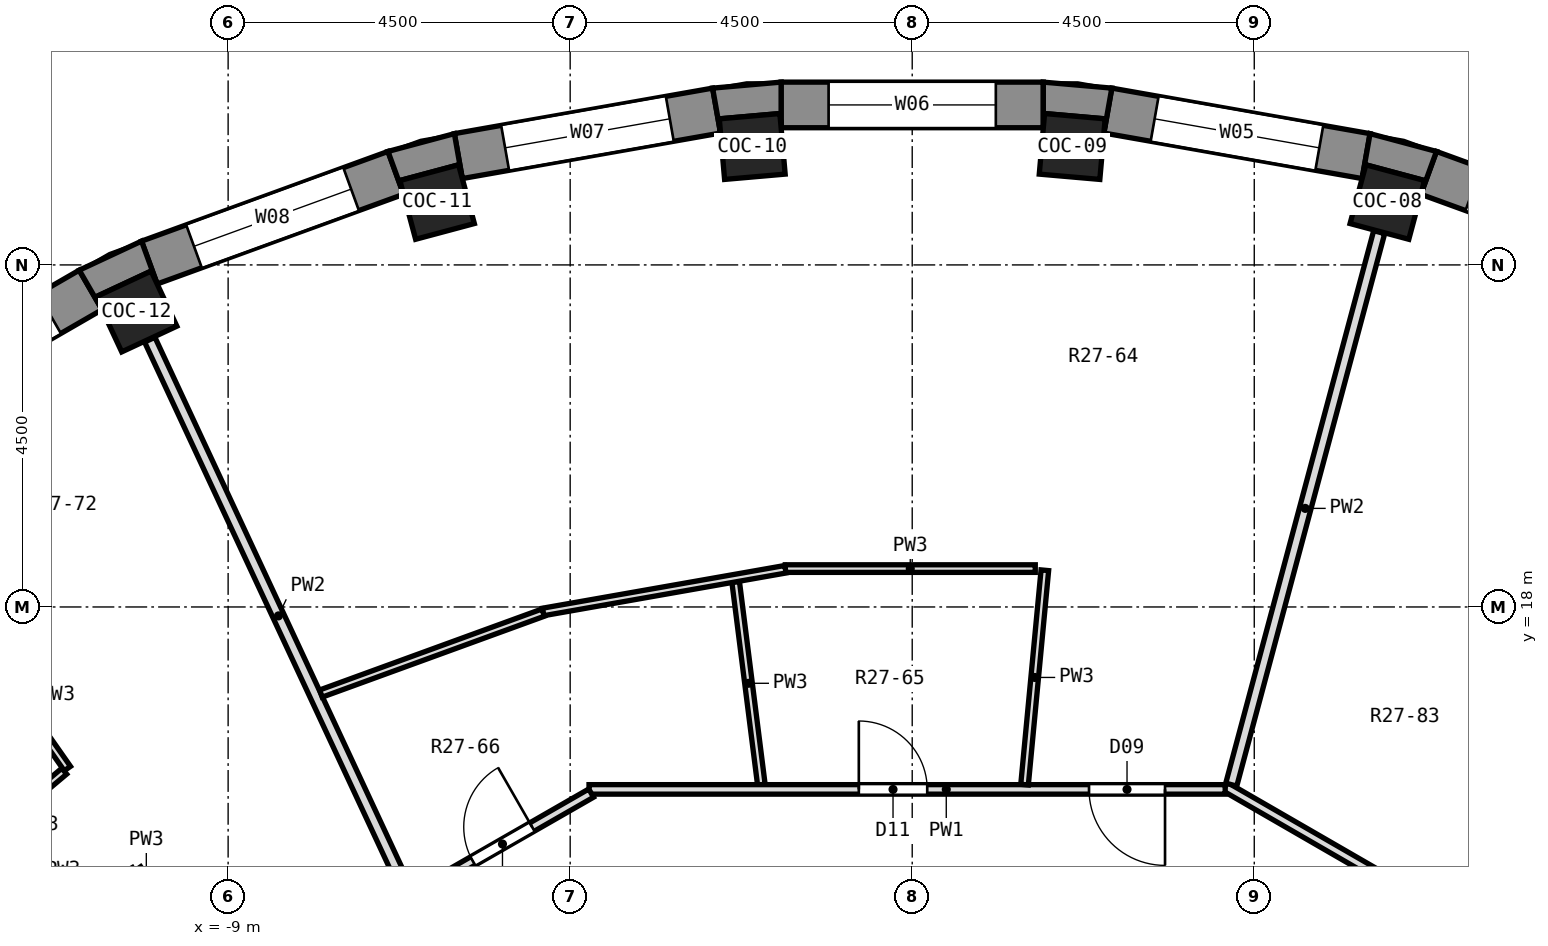
"""IFC4 building model, lengths in metres.
Left out: names, types, materials, properties, quantities, classifications, styles, units other than length and angle.
Written with IfcOpenShell. Run it as: python <this file> out.ifc"""

import sys

from ifc_helpers import new_model, si_unit, direction, frame, frame_2d, origin, origin_2d, place, context, subcontext, project, spatial, polyline, rectangle, outline, extrude, element, fill, save


model = new_model("IFC4")
c1 = context("Model", 3, precision=1e-05, world=origin(), true_north=direction((0.0, 1.0)))
c2 = subcontext(c1, "Body", "Model", "MODEL_VIEW")
j1 = project(units=[si_unit("LENGTHUNIT", "METRE"), si_unit("PLANEANGLEUNIT", "RADIAN")], contexts=[c1])
p1 = place(None, origin())
s1 = spatial("IfcSite", under=j1, at=p1, CompositionType="ELEMENT")
p2 = place(p1, origin())
s2 = spatial("IfcBuilding", under=s1, at=p2, CompositionType="ELEMENT")
p3 = place(p2, frame((0.0, 0.0, 180.6)))
s3 = spatial("IfcBuildingStorey", under=s2, at=p3, CompositionType="ELEMENT", Elevation=180.6)
for number, where, z_axis, x_axis in (
    (1, (6.25, 23.327, 0.0), (0.0, 0.0, 1.0), (0.259, 0.966, 0.0)),
    (2, (2.105, 24.058, 0.0), (0.0, 0.0, 1.0), (0.087, 0.996, 0.0)),
    (3, (-2.105, 24.058, 0.0), (0.0, 0.0, 1.0), (-0.087, 0.996, 0.0)),
    (4, (-6.25, 23.327, 0.0), (0.0, 0.0, 1.0), (-0.259, 0.966, 0.0)),
    (5, (-10.206, 21.887, 0.0), (0.0, 0.0, 1.0), (-0.423, 0.906, 0.0)),
):
    element("IfcColumn", number, at=place(p3, frame(where, z_axis=z_axis, x_axis=x_axis)), inside=s3, PredefinedType="COLUMN", context=c2, shape_type="SweptSolid", body=[
        extrude(rectangle(XDim=0.8, YDim=0.8, at=origin_2d()), origin(), (0.0, 0.0, 1.0), 3.3),
    ])
p4 = place(p3, frame((10.036, 22.531, 0.0), z_axis=(0.0, 0.0, 1.0), x_axis=(-0.93968799822, 0.342032843455, 0.0)))
e6 = element("IfcWall", 6, at=p4, inside=s3, PredefinedType="SOLIDWALL", context=c2, shape_type="SweptSolid", body=[
    extrude(rectangle(XDim=3.45, YDim=0.6, at=frame_2d((1.725, 0.0))), origin(), (0.0, 0.0, 1.0), 2.85),
])
p5 = place(p4, frame((0.625, 0.0, 0.9)))
e7 = element("IfcOpeningElement", 7, at=p5, cuts=e6, PredefinedType="OPENING", context=c2, shape_type="SweptSolid", body=[
    extrude(rectangle(XDim=2.2, YDim=1.8, at=frame_2d((1.1, 0.9))), frame((0.0, 0.312, 0.0), z_axis=(0.0, -1.0, 0.0), x_axis=(1.0, 0.0, 0.0)), (0.0, 0.0, 1.0), 0.624),
])
p6 = place(p3, frame((5.971, 23.932, 0.0), z_axis=(0.0, 0.0, 1.0), x_axis=(-0.984814892183, 0.173607684551, 0.0)))
e8 = element("IfcWall", 8, at=p6, inside=s3, PredefinedType="SOLIDWALL", context=c2, shape_type="SweptSolid", body=[
    extrude(rectangle(XDim=3.45, YDim=0.6, at=frame_2d((1.725, 0.0))), origin(), (0.0, 0.0, 1.0), 2.85),
])
p7 = place(p6, frame((0.625, 0.0, 0.9)))
e9 = element("IfcOpeningElement", 9, at=p7, cuts=e8, PredefinedType="OPENING", context=c2, shape_type="SweptSolid", body=[
    extrude(rectangle(XDim=2.2, YDim=1.8, at=frame_2d((1.1, 0.9))), frame((0.0, 0.312, 0.0), z_axis=(0.0, -1.0, 0.0), x_axis=(1.0, 0.0, 0.0)), (0.0, 0.0, 1.0), 0.624),
])
p8 = place(p3, frame((1.725, 24.605, 0.0), z_axis=(0.0, 0.0, 1.0), x_axis=(-1.0, 0.0, 0.0)))
e10 = element("IfcWall", 10, at=p8, inside=s3, PredefinedType="SOLIDWALL", context=c2, shape_type="SweptSolid", body=[
    extrude(rectangle(XDim=3.45, YDim=0.6, at=frame_2d((1.725, 0.0))), origin(), (0.0, 0.0, 1.0), 2.85),
])
p9 = place(p8, frame((0.625, 0.0, 0.9)))
e11 = element("IfcOpeningElement", 11, at=p9, cuts=e10, PredefinedType="OPENING", context=c2, shape_type="SweptSolid", body=[
    extrude(rectangle(XDim=2.2, YDim=1.8, at=frame_2d((1.1, 0.9))), frame((0.0, 0.312, 0.0), z_axis=(0.0, -1.0, 0.0), x_axis=(1.0, 0.0, 0.0)), (0.0, 0.0, 1.0), 0.624),
])
p10 = place(p3, frame((-2.574, 24.531, 0.0), z_axis=(0.0, 0.0, 1.0), x_axis=(-0.984814892183, -0.173607684551, 0.0)))
e12 = element("IfcWall", 12, at=p10, inside=s3, PredefinedType="SOLIDWALL", context=c2, shape_type="SweptSolid", body=[
    extrude(rectangle(XDim=3.45, YDim=0.6, at=frame_2d((1.725, 0.0))), origin(), (0.0, 0.0, 1.0), 2.85),
])
p11 = place(p10, frame((0.625, 0.0, 0.9)))
e13 = element("IfcOpeningElement", 13, at=p11, cuts=e12, PredefinedType="OPENING", context=c2, shape_type="SweptSolid", body=[
    extrude(rectangle(XDim=2.2, YDim=1.8, at=frame_2d((1.1, 0.9))), frame((0.0, 0.312, 0.0), z_axis=(0.0, -1.0, 0.0), x_axis=(1.0, 0.0, 0.0)), (0.0, 0.0, 1.0), 0.624),
])
p12 = place(p3, frame((-6.794, 23.711, 0.0), z_axis=(0.0, 0.0, 1.0), x_axis=(-0.93968799822, -0.342032843455, 0.0)))
e14 = element("IfcWall", 14, at=p12, inside=s3, PredefinedType="SOLIDWALL", context=c2, shape_type="SweptSolid", body=[
    extrude(rectangle(XDim=3.45, YDim=0.6, at=frame_2d((1.725, 0.0))), origin(), (0.0, 0.0, 1.0), 2.85),
])
p13 = place(p12, frame((0.625, 0.0, 0.9)))
e15 = element("IfcOpeningElement", 15, at=p13, cuts=e14, PredefinedType="OPENING", context=c2, shape_type="SweptSolid", body=[
    extrude(rectangle(XDim=2.2, YDim=1.8, at=frame_2d((1.1, 0.9))), frame((0.0, 0.312, 0.0), z_axis=(0.0, -1.0, 0.0), x_axis=(1.0, 0.0, 0.0)), (0.0, 0.0, 1.0), 0.624),
])
p14 = place(p3, frame((-10.809, 22.171, 0.0), z_axis=(0.0, 0.0, 1.0), x_axis=(-0.86602648383, -0.499998129301, 0.0)))
e16 = element("IfcWall", 16, at=p14, inside=s3, PredefinedType="SOLIDWALL", context=c2, shape_type="SweptSolid", body=[
    extrude(rectangle(XDim=3.45, YDim=0.6, at=frame_2d((1.725, 0.0))), origin(), (0.0, 0.0, 1.0), 2.85),
])
p15 = place(p14, frame((0.625, 0.0, 0.9)))
e17 = element("IfcOpeningElement", 17, at=p15, cuts=e16, PredefinedType="OPENING", context=c2, shape_type="SweptSolid", body=[
    extrude(rectangle(XDim=2.2, YDim=1.8, at=frame_2d((1.1, 0.9))), frame((0.0, 0.312, 0.0), z_axis=(0.0, -1.0, 0.0), x_axis=(1.0, 0.0, 0.0)), (0.0, 0.0, 1.0), 0.624),
])
p16 = place(p3, origin())
e18 = element("IfcWall", 18, at=p16, inside=s3, PredefinedType="SOLIDWALL", context=c2, shape_type="SweptSolid", body=[
    extrude(outline(polyline([(6.023, 24.227), (5.919, 23.636), (5.968, 23.817), (6.74, 23.61), (6.692, 23.429), (6.897, 23.993), (6.023, 24.227)])), origin(), (0.0, 0.0, 1.0), 2.85),
])
p17 = place(p3, origin())
e19 = element("IfcWall", 19, at=p17, inside=s3, PredefinedType="SOLIDWALL", context=c2, shape_type="SweptSolid", body=[
    extrude(outline(polyline([(2.626, 24.826), (1.725, 24.905), (1.725, 24.305), (1.741, 24.491), (2.538, 24.422), (2.522, 24.235), (2.626, 24.826)])), origin(), (0.0, 0.0, 1.0), 2.85),
])
p18 = place(p3, origin())
e20 = element("IfcWall", 20, at=p18, inside=s3, PredefinedType="SOLIDWALL", context=c2, shape_type="SweptSolid", body=[
    extrude(outline(polyline([(-1.725, 24.905), (-2.626, 24.826), (-2.522, 24.235), (-2.538, 24.422), (-1.741, 24.491), (-1.725, 24.305), (-1.725, 24.905)])), origin(), (0.0, 0.0, 1.0), 2.85),
])
p19 = place(p3, origin())
e21 = element("IfcWall", 21, at=p19, inside=s3, PredefinedType="SOLIDWALL", context=c2, shape_type="SweptSolid", body=[
    extrude(outline(polyline([(-6.023, 24.227), (-6.897, 23.993), (-6.692, 23.429), (-6.74, 23.61), (-5.968, 23.817), (-5.919, 23.636), (-6.023, 24.227)])), origin(), (0.0, 0.0, 1.0), 2.85),
])
p20 = place(p3, origin())
e22 = element("IfcWall", 22, at=p20, inside=s3, PredefinedType="SOLIDWALL", context=c2, shape_type="SweptSolid", body=[
    extrude(outline(polyline([(-10.959, 22.431), (-10.659, 21.911), (-10.738, 22.081), (-10.013, 22.419), (-9.934, 22.249), (-10.139, 22.813), (-10.959, 22.431)])), origin(), (0.0, 0.0, 1.0), 2.85),
])
p21 = place(p3, frame((-2.323, 18.33, 0.0), z_axis=(0.0, 0.0, 1.0), x_axis=(0.125632208846, -0.992076886184, 0.0)))
e23 = element("IfcWall", 23, at=p21, inside=s3, PredefinedType="PARTITIONING", context=c2, shape_type="SweptSolid", body=[
    extrude(rectangle(XDim=2.689, YDim=0.1, at=frame_2d((1.345, 0.0))), origin(), (0.0, 0.0, 1.0), 2.85),
])
p22 = place(p3, frame((-10.031, 21.517, 0.0), z_axis=(0.0, 0.0, 1.0), x_axis=(0.422305280768, -0.906453666679, 0.0)))
e24 = element("IfcWall", 24, at=p22, inside=s3, PredefinedType="PARTITIONING", context=c2, shape_type="SweptSolid", body=[
    extrude(rectangle(XDim=8.018, YDim=0.15, at=frame_2d((4.009, 0.0))), origin(), (0.0, 0.0, 1.0), 2.85),
])
p23 = place(p3, frame((-12.468, 17.806, 0.0), z_axis=(0.0, 0.0, 1.0), x_axis=(0.573594339991, -0.819139507734, 0.0)))
e25 = element("IfcWall", 25, at=p23, inside=s3, PredefinedType="PARTITIONING", context=c2, shape_type="SweptSolid", body=[
    extrude(rectangle(XDim=2.358, YDim=0.1, at=frame_2d((1.179, 0.0))), origin(), (0.0, 0.0, 1.0), 2.85),
])
p24 = place(p3, frame((4.117, 15.636, 0.0), z_axis=(0.0, 0.0, 1.0), x_axis=(0.866036031404, -0.49998159197, 0.0)))
e26 = element("IfcWall", 26, at=p24, inside=s3, PredefinedType="PARTITIONING", context=c2, shape_type="SweptSolid", body=[
    extrude(rectangle(XDim=3.724, YDim=0.125, at=frame_2d((1.862, 0.0))), origin(), (0.0, 0.0, 1.0), 2.85),
])
p25 = place(p3, frame((-4.252, 15.6, 0.0), z_axis=(0.0, 0.0, 1.0), x_axis=(1.0, 0.0, 0.0)))
e27 = element("IfcWall", 27, at=p25, inside=s3, PredefinedType="PARTITIONING", context=c2, shape_type="SweptSolid", body=[
    extrude(rectangle(XDim=8.369, YDim=0.125, at=frame_2d((4.185, 0.0))), origin(), (0.0, 0.0, 1.0), 2.85),
])
p26 = place(p25, frame((6.578, 0.0, 0.0)))
e28 = element("IfcOpeningElement", 28, at=p26, cuts=e27, PredefinedType="OPENING", context=c2, shape_type="SweptSolid", body=[
    extrude(rectangle(XDim=1.0, YDim=2.1, at=frame_2d((0.5, 1.05))), frame((0.0, 0.074, 0.0), z_axis=(0.0, -1.0, 0.0), x_axis=(1.0, 0.0, 0.0)), (0.0, 0.0, 1.0), 0.149),
])
p27 = place(p25, frame((3.55, 0.0, 0.0)))
e29 = element("IfcOpeningElement", 29, at=p27, cuts=e27, PredefinedType="OPENING", context=c2, shape_type="SweptSolid", body=[
    extrude(rectangle(XDim=0.9, YDim=2.1, at=frame_2d((0.45, 1.05))), frame((0.0, 0.074, 0.0), z_axis=(0.0, -1.0, 0.0), x_axis=(1.0, 0.0, 0.0)), (0.0, 0.0, 1.0), 0.149),
])
p28 = place(p3, frame((-1.67, 18.505, 0.0), z_axis=(0.0, 0.0, 1.0), x_axis=(1.0, 0.0, 0.0)))
e30 = element("IfcWall", 30, at=p28, inside=s3, PredefinedType="PARTITIONING", context=c2, shape_type="SweptSolid", body=[
    extrude(rectangle(XDim=3.289, YDim=0.1, at=frame_2d((1.644, 0.0))), origin(), (0.0, 0.0, 1.0), 2.85),
])
p29 = place(p3, frame((-4.858, 17.934, 0.0), z_axis=(0.0, 0.0, 1.0), x_axis=(0.984816929669, 0.173596126217, 0.0)))
e31 = element("IfcWall", 31, at=p29, inside=s3, PredefinedType="PARTITIONING", context=c2, shape_type="SweptSolid", body=[
    extrude(rectangle(XDim=3.239, YDim=0.1, at=frame_2d((1.619, 0.0))), origin(), (0.0, 0.0, 1.0), 2.85),
])
p30 = place(p3, frame((-7.78, 16.861, 0.0), z_axis=(0.0, 0.0, 1.0), x_axis=(0.939616954474, 0.3422279633, 0.0)))
e32 = element("IfcWall", 32, at=p30, inside=s3, PredefinedType="PARTITIONING", context=c2, shape_type="SweptSolid", body=[
    extrude(rectangle(XDim=3.113, YDim=0.1, at=frame_2d((1.556, 0.0))), origin(), (0.0, 0.0, 1.0), 2.85),
])
p31 = place(p3, frame((-11.484, 11.385, 0.0), z_axis=(0.0, 0.0, 1.0), x_axis=(0.867331679026, 0.49773060842, 0.0)))
e33 = element("IfcWall", 33, at=p31, inside=s3, PredefinedType="PARTITIONING", context=c2, shape_type="SweptSolid", body=[
    extrude(rectangle(XDim=8.371, YDim=0.125, at=frame_2d((4.185, 0.0))), origin(), (0.0, 0.0, 1.0), 2.85),
])
p32 = place(p31, frame((6.575, 0.0, 0.0)))
e34 = element("IfcOpeningElement", 34, at=p32, cuts=e33, PredefinedType="OPENING", context=c2, shape_type="SweptSolid", body=[
    extrude(rectangle(XDim=0.9, YDim=2.1, at=frame_2d((0.45, 1.05))), frame((0.0, 0.074, 0.0), z_axis=(0.0, -1.0, 0.0), x_axis=(1.0, 0.0, 0.0)), (0.0, 0.0, 1.0), 0.149),
])
p33 = place(p3, frame((-12.842, 14.425, 0.0), z_axis=(0.0, 0.0, 1.0), x_axis=(0.766089344118, 0.642734094964, 0.0)))
e35 = element("IfcWall", 35, at=p33, inside=s3, PredefinedType="PARTITIONING", context=c2, shape_type="SweptSolid", body=[
    extrude(rectangle(XDim=2.201, YDim=0.1, at=frame_2d((1.101, 0.0))), origin(), (0.0, 0.0, 1.0), 2.85),
])
p34 = place(p3, frame((4.198, 15.663, 0.0), z_axis=(0.0, 0.0, 1.0), x_axis=(0.258633906583, 0.96597541499, 0.0)))
e36 = element("IfcWall", 36, at=p34, inside=s3, PredefinedType="PARTITIONING", context=c2, shape_type="SweptSolid", body=[
    extrude(rectangle(XDim=7.524, YDim=0.15, at=frame_2d((3.762, 0.0))), origin(), (0.0, 0.0, 1.0), 2.85),
])
p35 = place(p3, frame((1.478, 15.662, 0.0), z_axis=(0.0, 0.0, 1.0), x_axis=(0.094349605613, 0.995539126263, 0.0)))
e37 = element("IfcWall", 37, at=p35, inside=s3, PredefinedType="PARTITIONING", context=c2, shape_type="SweptSolid", body=[
    extrude(rectangle(XDim=2.833, YDim=0.1, at=frame_2d((1.417, 0.0))), origin(), (0.0, 0.0, 1.0), 2.85),
])
p36 = place(p7, origin())
e38 = element("IfcWindow", 38, at=p36, inside=s3, PartitioningType="SINGLE_PANEL", PredefinedType="WINDOW", context=c2, shape_type="SweptSolid", body=[
    extrude(rectangle(XDim=2.2, YDim=1.8, at=frame_2d((1.1, 0.9))), frame((0.0, 0.18, 0.0), z_axis=(0.0, -1.0, 0.0), x_axis=(1.0, 0.0, 0.0)), (0.0, 0.0, 1.0), 0.06),
])
fill(e9, e38)
p37 = place(p9, origin())
e39 = element("IfcWindow", 39, at=p37, inside=s3, PartitioningType="SINGLE_PANEL", PredefinedType="WINDOW", context=c2, shape_type="SweptSolid", body=[
    extrude(rectangle(XDim=2.2, YDim=1.8, at=frame_2d((1.1, 0.9))), frame((0.0, 0.18, 0.0), z_axis=(0.0, -1.0, 0.0), x_axis=(1.0, 0.0, 0.0)), (0.0, 0.0, 1.0), 0.06),
])
fill(e11, e39)
p38 = place(p11, origin())
e40 = element("IfcWindow", 40, at=p38, inside=s3, PartitioningType="SINGLE_PANEL", PredefinedType="WINDOW", context=c2, shape_type="SweptSolid", body=[
    extrude(rectangle(XDim=2.2, YDim=1.8, at=frame_2d((1.1, 0.9))), frame((0.0, 0.18, 0.0), z_axis=(0.0, -1.0, 0.0), x_axis=(1.0, 0.0, 0.0)), (0.0, 0.0, 1.0), 0.06),
])
fill(e13, e40)
p39 = place(p13, origin())
e41 = element("IfcWindow", 41, at=p39, inside=s3, PartitioningType="SINGLE_PANEL", PredefinedType="WINDOW", context=c2, shape_type="SweptSolid", body=[
    extrude(rectangle(XDim=2.2, YDim=1.8, at=frame_2d((1.1, 0.9))), frame((0.0, 0.18, 0.0), z_axis=(0.0, -1.0, 0.0), x_axis=(1.0, 0.0, 0.0)), (0.0, 0.0, 1.0), 0.06),
])
fill(e15, e41)
p40 = place(p15, origin())
e42 = element("IfcWindow", 42, at=p40, inside=s3, PartitioningType="SINGLE_PANEL", PredefinedType="WINDOW", context=c2, shape_type="SweptSolid", body=[
    extrude(rectangle(XDim=2.2, YDim=1.8, at=frame_2d((1.1, 0.9))), frame((0.0, 0.18, 0.0), z_axis=(0.0, -1.0, 0.0), x_axis=(1.0, 0.0, 0.0)), (0.0, 0.0, 1.0), 0.06),
])
fill(e17, e42)
p41 = place(p26, frame((1.0, 0.0, 0.0), z_axis=(0.0, 0.0, 1.0), x_axis=(-1.0, 0.0, 0.0)))
e43 = element("IfcDoor", 43, at=p41, inside=s3, OperationType="SINGLE_SWING_LEFT", PredefinedType="DOOR", context=c2, shape_type="SweptSolid", body=[
    extrude(rectangle(XDim=1.0, YDim=2.1, at=frame_2d((0.5, 1.05))), frame((0.0, 0.025, 0.0), z_axis=(0.0, -1.0, 0.0), x_axis=(1.0, 0.0, 0.0)), (0.0, 0.0, 1.0), 0.05),
])
fill(e28, e43)
p42 = place(p27, origin())
e44 = element("IfcDoor", 44, at=p42, inside=s3, OperationType="SINGLE_SWING_LEFT", PredefinedType="DOOR", context=c2, shape_type="SweptSolid", body=[
    extrude(rectangle(XDim=0.9, YDim=2.1, at=frame_2d((0.45, 1.05))), frame((0.0, 0.025, 0.0), z_axis=(0.0, -1.0, 0.0), x_axis=(1.0, 0.0, 0.0)), (0.0, 0.0, 1.0), 0.05),
])
fill(e29, e44)
p43 = place(p32, origin())
e45 = element("IfcDoor", 45, at=p43, inside=s3, OperationType="SINGLE_SWING_RIGHT", PredefinedType="DOOR", context=c2, shape_type="SweptSolid", body=[
    extrude(rectangle(XDim=0.9, YDim=2.1, at=frame_2d((0.45, 1.05))), frame((0.0, 0.025, 0.0), z_axis=(0.0, -1.0, 0.0), x_axis=(1.0, 0.0, 0.0)), (0.0, 0.0, 1.0), 0.05),
])
fill(e34, e45)
save(model, sys.argv[1])
